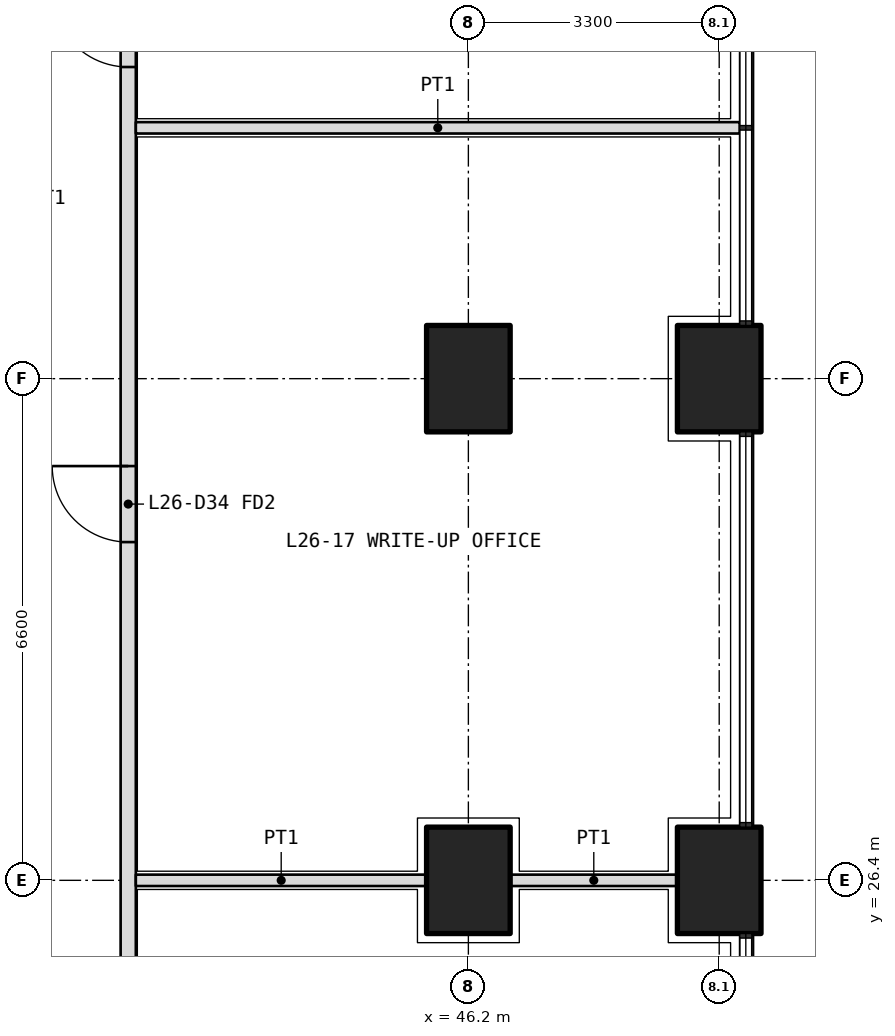
"""IFC4 building model, lengths in metres.
Left out: names, types, materials, properties, quantities, classifications, styles, units other than length and angle.
Written with IfcOpenShell. Run it as: python <this file> out.ifc"""

import sys

from ifc_helpers import new_model, si_unit, direction, frame, frame_2d, origin, origin_2d, place, context, subcontext, project, spatial, rectangle, extrude, element, fill, save


model = new_model("IFC4")
c1 = context("Model", 3, precision=1e-05, world=origin(), true_north=direction((0.0, 1.0)))
c2 = subcontext(c1, "Body", "Model", "MODEL_VIEW")
j1 = project(units=[si_unit("LENGTHUNIT", "METRE"), si_unit("PLANEANGLEUNIT", "RADIAN")], contexts=[c1])
p1 = place(None, origin())
s1 = spatial("IfcSite", under=j1, at=p1, CompositionType="ELEMENT")
p2 = place(p1, origin())
s2 = spatial("IfcBuilding", under=s1, at=p2, CompositionType="ELEMENT")
p3 = place(p2, frame((0.0, 0.0, 115.8)))
s3 = spatial("IfcBuildingStorey", under=s2, at=p3, CompositionType="ELEMENT", Elevation=115.8)
for number, where, z_axis, x_axis in (
    (1, (49.5, 26.4, 0.0), (0.0, 0.0, 1.0), (0.0, 1.0, 0.0)),
    (2, (49.5, 33.0, 0.0), (0.0, 0.0, 1.0), (0.0, 1.0, 0.0)),
    (3, (46.2, 26.4, 0.0), (0.0, 0.0, 1.0), (0.0, 1.0, 0.0)),
    (4, (46.2, 33.0, 0.0), (0.0, 0.0, 1.0), (0.0, 1.0, 0.0)),
):
    element("IfcColumn", number, at=place(p3, frame(where, z_axis=z_axis, x_axis=x_axis)), inside=s3, PredefinedType="COLUMN", context=c2, shape_type="SweptSolid", body=[
        extrude(rectangle(XDim=1.4, YDim=1.1, at=origin_2d()), origin(), (0.0, 0.0, 1.0), 4.2),
    ])
p4 = place(p3, frame((41.725, 11.175, 0.0), z_axis=(0.0, 0.0, 1.0), x_axis=(0.0, 1.0, 0.0)))
e5 = element("IfcWall", 5, at=p4, inside=s3, PredefinedType="PARTITIONING", context=c2, shape_type="SweptSolid", body=[
    extrude(rectangle(XDim=27.625, YDim=0.2, at=frame_2d((13.812, 0.0))), origin(), (0.0, 0.0, 1.0), 2.85),
])
p5 = place(p4, frame((3.762, 0.0, 0.0)))
e6 = element("IfcOpeningElement", 6, at=p5, cuts=e5, PredefinedType="OPENING", context=c2, shape_type="SweptSolid", body=[
    extrude(rectangle(XDim=1.0, YDim=2.1, at=frame_2d((0.5, 1.05))), frame((0.0, 0.11, 0.0), z_axis=(0.0, -1.0, 0.0), x_axis=(1.0, 0.0, 0.0)), (0.0, 0.0, 1.0), 0.22),
])
p6 = place(p4, frame((9.625, 0.0, 0.0)))
e7 = element("IfcOpeningElement", 7, at=p6, cuts=e5, PredefinedType="OPENING", context=c2, shape_type="SweptSolid", body=[
    extrude(rectangle(XDim=1.0, YDim=2.1, at=frame_2d((0.5, 1.05))), frame((0.0, 0.11, 0.0), z_axis=(0.0, -1.0, 0.0), x_axis=(1.0, 0.0, 0.0)), (0.0, 0.0, 1.0), 0.22),
])
p7 = place(p4, frame((12.975, 0.0, 0.0)))
e8 = element("IfcOpeningElement", 8, at=p7, cuts=e5, PredefinedType="OPENING", context=c2, shape_type="SweptSolid", body=[
    extrude(rectangle(XDim=0.9, YDim=2.1, at=frame_2d((0.45, 1.05))), frame((0.0, 0.11, 0.0), z_axis=(0.0, -1.0, 0.0), x_axis=(1.0, 0.0, 0.0)), (0.0, 0.0, 1.0), 0.22),
])
p8 = place(p4, frame((19.675, 0.0, 0.0)))
e9 = element("IfcOpeningElement", 9, at=p8, cuts=e5, PredefinedType="OPENING", context=c2, shape_type="SweptSolid", body=[
    extrude(rectangle(XDim=1.0, YDim=2.1, at=frame_2d((0.5, 1.05))), frame((0.0, 0.11, 0.0), z_axis=(0.0, -1.0, 0.0), x_axis=(1.0, 0.0, 0.0)), (0.0, 0.0, 1.0), 0.22),
])
p9 = place(p4, frame((25.925, 0.0, 0.0)))
e10 = element("IfcOpeningElement", 10, at=p9, cuts=e5, PredefinedType="OPENING", context=c2, shape_type="SweptSolid", body=[
    extrude(rectangle(XDim=1.0, YDim=2.1, at=frame_2d((0.5, 1.05))), frame((0.0, 0.11, 0.0), z_axis=(0.0, -1.0, 0.0), x_axis=(1.0, 0.0, 0.0)), (0.0, 0.0, 1.0), 0.22),
])
p10 = place(p3, frame((48.95, 26.4, 0.0), z_axis=(0.0, 0.0, 1.0), x_axis=(-1.0, 0.0, 0.0)))
e11 = element("IfcWall", 11, at=p10, inside=s3, PredefinedType="PARTITIONING", context=c2, shape_type="SweptSolid", body=[
    extrude(rectangle(XDim=2.2, YDim=0.15, at=frame_2d((1.1, 0.0))), origin(), (0.0, 0.0, 1.0), 2.85),
])
p11 = place(p3, frame((45.65, 26.4, 0.0), z_axis=(0.0, 0.0, 1.0), x_axis=(-1.0, 0.0, 0.0)))
e12 = element("IfcWall", 12, at=p11, inside=s3, PredefinedType="PARTITIONING", context=c2, shape_type="SweptSolid", body=[
    extrude(rectangle(XDim=3.825, YDim=0.15, at=frame_2d((1.913, 0.0))), origin(), (0.0, 0.0, 1.0), 2.85),
])
p12 = place(p3, frame((49.77, 36.3, 0.0), z_axis=(0.0, 0.0, 1.0), x_axis=(-1.0, 0.0, 0.0)))
e13 = element("IfcWall", 13, at=p12, inside=s3, PredefinedType="PARTITIONING", context=c2, shape_type="SweptSolid", body=[
    extrude(rectangle(XDim=7.945, YDim=0.15, at=frame_2d((3.973, 0.0))), origin(), (0.0, 0.0, 1.0), 2.7),
])
p13 = place(p8, origin())
e14 = element("IfcDoor", 14, at=p13, inside=s3, OperationType="SINGLE_SWING_RIGHT", PredefinedType="DOOR", context=c2, shape_type="SweptSolid", body=[
    extrude(rectangle(XDim=1.0, YDim=2.1, at=frame_2d((0.5, 1.05))), frame((0.0, 0.025, 0.0), z_axis=(0.0, -1.0, 0.0), x_axis=(1.0, 0.0, 0.0)), (0.0, 0.0, 1.0), 0.05),
])
fill(e9, e14)
p14 = place(p9, origin())
e15 = element("IfcDoor", 15, at=p14, inside=s3, OperationType="SINGLE_SWING_RIGHT", PredefinedType="DOOR", context=c2, shape_type="SweptSolid", body=[
    extrude(rectangle(XDim=1.0, YDim=2.1, at=frame_2d((0.5, 1.05))), frame((0.0, 0.025, 0.0), z_axis=(0.0, -1.0, 0.0), x_axis=(1.0, 0.0, 0.0)), (0.0, 0.0, 1.0), 0.05),
])
fill(e10, e15)
save(model, sys.argv[1])
